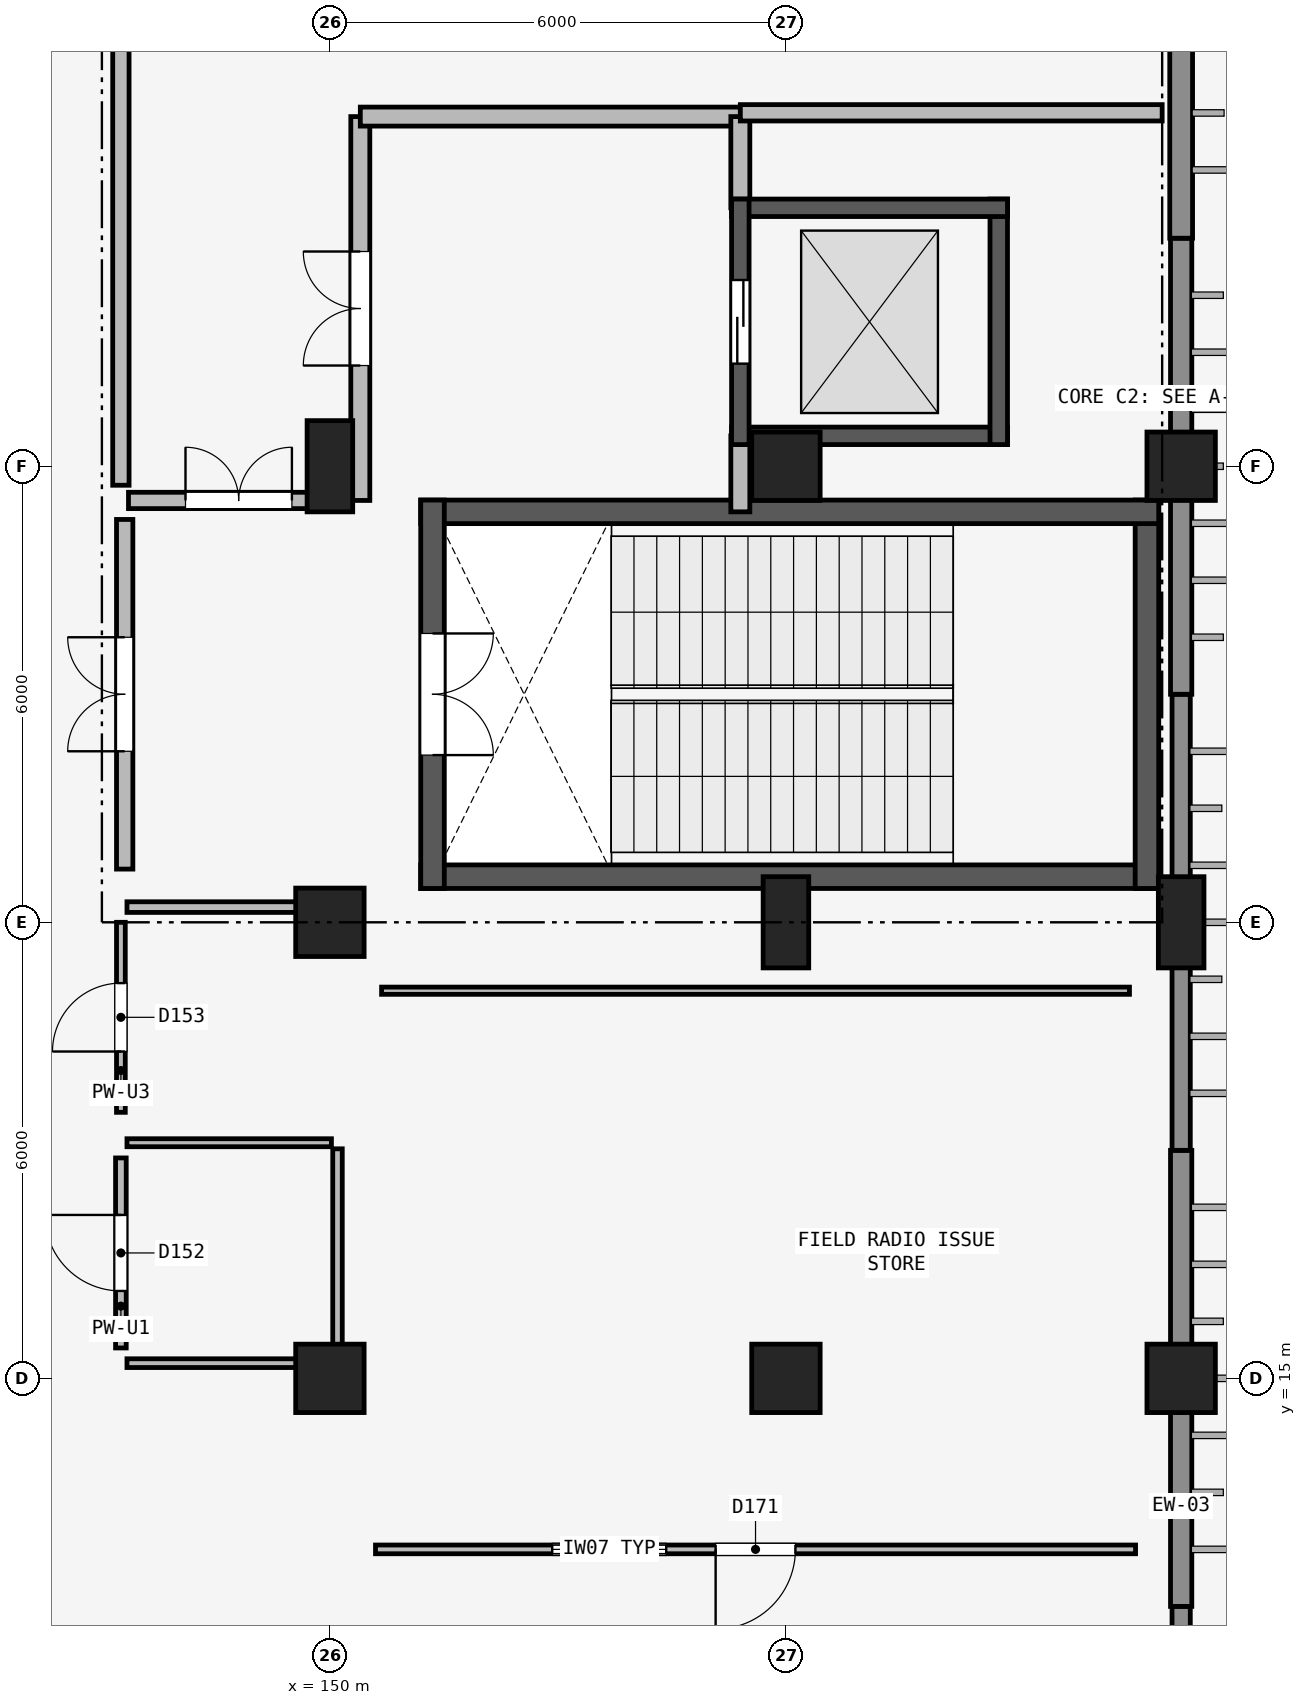
"""IFC4 building model, lengths in metres.
Left out: names, types, materials, properties, quantities, classifications, styles, units other than length and angle.
Written with IfcOpenShell. Run it as: python <this file> out.ifc"""

import sys

from ifc_helpers import new_model, si_unit, direction, frame, frame_2d, origin, origin_2d, place, context, subcontext, project, spatial, rectangle, extrude, element, fill, save


model = new_model("IFC4")
c1 = context("Model", 3, precision=1e-05, world=origin(), true_north=direction((0.0, 1.0)))
c2 = subcontext(c1, "Body", "Model", "MODEL_VIEW")
j1 = project(units=[si_unit("LENGTHUNIT", "METRE"), si_unit("PLANEANGLEUNIT", "RADIAN")], contexts=[c1])
p1 = place(None, origin())
s1 = spatial("IfcSite", under=j1, at=p1, CompositionType="ELEMENT")
p2 = place(p1, origin())
s2 = spatial("IfcBuilding", under=s1, at=p2, CompositionType="ELEMENT")
p3 = place(p2, origin())
s3 = spatial("IfcBuildingStorey", under=s2, at=p3, CompositionType="ELEMENT", Elevation=0.0)
for number, where, z_axis, x_axis in (
    (1, (150.0, 15.0, 0.0), (0.0, 0.0, 1.0), (1.0, 0.0, 0.0)),
    (2, (150.0, 21.0, 0.0), (0.0, 0.0, 1.0), (1.0, 0.0, 0.0)),
):
    element("IfcColumn", number, at=place(p3, frame(where, z_axis=z_axis, x_axis=x_axis)), inside=s3, PredefinedType="COLUMN", context=c2, shape_type="SweptSolid", body=[
        extrude(rectangle(XDim=0.9, YDim=0.9, at=origin_2d()), origin(), (0.0, 0.0, 1.0), 4.8),
    ])
p4 = place(p3, frame((150.0, 27.0, 0.0), z_axis=(0.0, 0.0, 1.0), x_axis=(1.0, 0.0, 0.0)))
e3 = element("IfcColumn", 3, at=p4, inside=s3, PredefinedType="COLUMN", context=c2, shape_type="SweptSolid", body=[
    extrude(rectangle(XDim=0.6, YDim=1.2, at=origin_2d()), origin(), (0.0, 0.0, 1.0), 4.8),
])
p5 = place(p3, frame((156.0, 15.0, 0.0), z_axis=(0.0, 0.0, 1.0), x_axis=(1.0, 0.0, 0.0)))
e4 = element("IfcColumn", 4, at=p5, inside=s3, PredefinedType="COLUMN", context=c2, shape_type="SweptSolid", body=[
    extrude(rectangle(XDim=0.9, YDim=0.9, at=origin_2d()), origin(), (0.0, 0.0, 1.0), 4.8),
])
p6 = place(p3, frame((156.0, 21.0, 0.0), z_axis=(0.0, 0.0, 1.0), x_axis=(1.0, 0.0, 0.0)))
e5 = element("IfcColumn", 5, at=p6, inside=s3, PredefinedType="COLUMN", context=c2, shape_type="SweptSolid", body=[
    extrude(rectangle(XDim=0.6, YDim=1.2, at=origin_2d()), origin(), (0.0, 0.0, 1.0), 4.8),
])
for number, where, z_axis, x_axis in (
    (6, (156.0, 27.0, 0.0), (0.0, 0.0, 1.0), (1.0, 0.0, 0.0)),
    (7, (161.2, 15.0, 0.0), (0.0, 0.0, 1.0), (1.0, 0.0, 0.0)),
):
    element("IfcColumn", number, at=place(p3, frame(where, z_axis=z_axis, x_axis=x_axis)), inside=s3, PredefinedType="COLUMN", context=c2, shape_type="SweptSolid", body=[
        extrude(rectangle(XDim=0.9, YDim=0.9, at=origin_2d()), origin(), (0.0, 0.0, 1.0), 4.8),
    ])
p7 = place(p3, frame((161.2, 21.0, 0.0), z_axis=(0.0, 0.0, 1.0), x_axis=(1.0, 0.0, 0.0)))
e8 = element("IfcColumn", 8, at=p7, inside=s3, PredefinedType="COLUMN", context=c2, shape_type="SweptSolid", body=[
    extrude(rectangle(XDim=0.6, YDim=1.2, at=origin_2d()), origin(), (0.0, 0.0, 1.0), 4.8),
])
p8 = place(p3, frame((161.2, 27.0, 0.0), z_axis=(0.0, 0.0, 1.0), x_axis=(1.0, 0.0, 0.0)))
e9 = element("IfcColumn", 9, at=p8, inside=s3, PredefinedType="COLUMN", context=c2, shape_type="SweptSolid", body=[
    extrude(rectangle(XDim=0.9, YDim=0.9, at=origin_2d()), origin(), (0.0, 0.0, 1.0), 4.8),
])
p9 = place(p3, frame((161.2, 6.0, 0.0), z_axis=(0.0, 0.0, 1.0), x_axis=(0.0, 1.0, 0.0)))
e10 = element("IfcWall", 10, at=p9, inside=s3, PredefinedType="SOLIDWALL", context=c2, shape_type="SweptSolid", body=[
    extrude(rectangle(XDim=6.0, YDim=0.24, at=frame_2d((3.0, 0.0))), origin(), (0.0, 0.0, 1.0), 3.94),
])
p10 = place(p3, frame((161.2, 12.0, 0.0), z_axis=(0.0, 0.0, 1.0), x_axis=(0.0, 1.0, 0.0)))
e11 = element("IfcWall", 11, at=p10, inside=s3, PredefinedType="SOLIDWALL", context=c2, shape_type="SweptSolid", body=[
    extrude(rectangle(XDim=6.0, YDim=0.28, at=frame_2d((3.0, 0.0))), origin(), (0.0, 0.0, 1.0), 3.94),
])
p11 = place(p3, frame((161.2, 18.0, 0.0), z_axis=(0.0, 0.0, 1.0), x_axis=(0.0, 1.0, 0.0)))
e12 = element("IfcWall", 12, at=p11, inside=s3, PredefinedType="SOLIDWALL", context=c2, shape_type="SweptSolid", body=[
    extrude(rectangle(XDim=6.0, YDim=0.24, at=frame_2d((3.0, 0.0))), origin(), (0.0, 0.0, 1.0), 3.94),
])
p12 = place(p3, frame((161.2, 24.0, 0.0), z_axis=(0.0, 0.0, 1.0), x_axis=(0.0, 1.0, 0.0)))
e13 = element("IfcWall", 13, at=p12, inside=s3, PredefinedType="SOLIDWALL", context=c2, shape_type="SweptSolid", body=[
    extrude(rectangle(XDim=6.0, YDim=0.28, at=frame_2d((3.0, 0.0))), origin(), (0.0, 0.0, 1.0), 3.94),
])
p13 = place(p3, frame((161.2, 30.0, 0.0), z_axis=(0.0, 0.0, 1.0), x_axis=(0.0, 1.0, 0.0)))
e14 = element("IfcWall", 14, at=p13, inside=s3, PredefinedType="SOLIDWALL", context=c2, shape_type="SweptSolid", body=[
    extrude(rectangle(XDim=2.546, YDim=0.3, at=frame_2d((1.273, 0.0))), origin(), (0.0, 0.0, 1.0), 3.99),
])
p14 = place(p3, frame((151.195, 21.6, 0.0), z_axis=(0.0, 0.0, 1.0), x_axis=(1.0, 0.0, 0.0)))
e15 = element("IfcWall", 15, at=p14, inside=s3, PredefinedType="SHEAR", context=c2, shape_type="SweptSolid", body=[
    extrude(rectangle(XDim=9.71, YDim=0.31, at=frame_2d((4.855, 0.0))), origin(), (0.0, 0.0, 1.0), 4.66),
])
p15 = place(p3, frame((160.75, 21.445, 0.0), z_axis=(0.0, 0.0, 1.0), x_axis=(0.0, 1.0, 0.0)))
e16 = element("IfcWall", 16, at=p15, inside=s3, PredefinedType="SHEAR", context=c2, shape_type="SweptSolid", body=[
    extrude(rectangle(XDim=5.11, YDim=0.31, at=frame_2d((2.555, 0.0))), origin(), (0.0, 0.0, 1.0), 4.66),
])
p16 = place(p3, frame((160.905, 26.4, 0.0), z_axis=(0.0, 0.0, 1.0), x_axis=(-1.0, 0.0, 0.0)))
e17 = element("IfcWall", 17, at=p16, inside=s3, PredefinedType="SHEAR", context=c2, shape_type="SweptSolid", body=[
    extrude(rectangle(XDim=9.71, YDim=0.31, at=frame_2d((4.855, 0.0))), origin(), (0.0, 0.0, 1.0), 4.66),
])
p17 = place(p3, frame((151.35, 26.555, 0.0), z_axis=(0.0, 0.0, 1.0), x_axis=(0.0, -1.0, 0.0)))
e18 = element("IfcWall", 18, at=p17, inside=s3, PredefinedType="SHEAR", context=c2, shape_type="SweptSolid", body=[
    extrude(rectangle(XDim=5.11, YDim=0.31, at=frame_2d((2.555, 0.0))), origin(), (0.0, 0.0, 1.0), 4.66),
])
p18 = place(p17, frame((1.755, 0.0, 0.0)))
e19 = element("IfcOpeningElement", 19, at=p18, cuts=e18, PredefinedType="OPENING", context=c2, shape_type="SweptSolid", body=[
    extrude(rectangle(XDim=1.6, YDim=2.2, at=frame_2d((0.8, 1.1))), frame((0.0, 0.165, 0.0), z_axis=(0.0, -1.0, 0.0), x_axis=(1.0, 0.0, 0.0)), (0.0, 0.0, 1.0), 0.33),
])
p19 = place(p3, frame((147.3, 21.7, 0.0), z_axis=(0.0, 0.0, 1.0), x_axis=(0.0, 1.0, 0.0)))
e20 = element("IfcWall", 20, at=p19, inside=s3, PredefinedType="PARTITIONING", context=c2, shape_type="SweptSolid", body=[
    extrude(rectangle(XDim=4.6, YDim=0.215, at=frame_2d((2.3, 0.0))), origin(), (0.0, 0.0, 1.0), 4.49),
])
p20 = place(p19, frame((1.55, 0.0, 0.0)))
e21 = element("IfcOpeningElement", 21, at=p20, cuts=e20, PredefinedType="OPENING", context=c2, shape_type="SweptSolid", body=[
    extrude(rectangle(XDim=1.5, YDim=2.15, at=frame_2d((0.75, 1.075))), frame((0.0, 0.117, 0.0), z_axis=(0.0, -1.0, 0.0), x_axis=(1.0, 0.0, 0.0)), (0.0, 0.0, 1.0), 0.235),
])
p21 = place(p3, frame((150.4, 26.55, 0.0), z_axis=(0.0, 0.0, 1.0), x_axis=(0.0, 1.0, 0.0)))
e22 = element("IfcWall", 22, at=p21, inside=s3, PredefinedType="PARTITIONING", context=c2, shape_type="SweptSolid", body=[
    extrude(rectangle(XDim=5.05, YDim=0.25, at=frame_2d((2.525, 0.0))), origin(), (0.0, 0.0, 1.0), 3.89),
])
p22 = place(p21, frame((1.775, 0.0, 0.0)))
e23 = element("IfcOpeningElement", 23, at=p22, cuts=e22, PredefinedType="OPENING", context=c2, shape_type="SweptSolid", body=[
    extrude(rectangle(XDim=1.5, YDim=2.15, at=frame_2d((0.75, 1.075))), frame((0.0, 0.135, 0.0), z_axis=(0.0, -1.0, 0.0), x_axis=(1.0, 0.0, 0.0)), (0.0, 0.0, 1.0), 0.27),
])
p23 = place(p3, frame((150.4, 31.6, 0.0), z_axis=(0.0, 0.0, 1.0), x_axis=(1.0, 0.0, 0.0)))
e24 = element("IfcWall", 24, at=p23, inside=s3, PredefinedType="PARTITIONING", context=c2, shape_type="SweptSolid", body=[
    extrude(rectangle(XDim=5.0, YDim=0.25, at=frame_2d((2.5, 0.0))), origin(), (0.0, 0.0, 1.0), 4.09),
])
p24 = place(p3, frame((155.4, 30.4, 0.0), z_axis=(0.0, 0.0, 1.0), x_axis=(0.0, 1.0, 0.0)))
e25 = element("IfcWall", 25, at=p24, inside=s3, PredefinedType="PARTITIONING", context=c2, shape_type="SweptSolid", body=[
    extrude(rectangle(XDim=1.2, YDim=0.25, at=frame_2d((0.6, 0.0))), origin(), (0.0, 0.0, 1.0), 4.49),
])
p25 = place(p3, frame((155.4, 26.4, 0.0), z_axis=(0.0, 0.0, 1.0), x_axis=(0.0, 1.0, 0.0)))
e26 = element("IfcWall", 26, at=p25, inside=s3, PredefinedType="PARTITIONING", context=c2, shape_type="SweptSolid", body=[
    extrude(rectangle(XDim=1.0, YDim=0.25, at=frame_2d((0.5, 0.0))), origin(), (0.0, 0.0, 1.0), 3.89),
])
p26 = place(p3, frame((155.285, 27.4, 0.0), z_axis=(0.0, 0.0, 1.0), x_axis=(1.0, 0.0, 0.0)))
e27 = element("IfcWall", 27, at=p26, inside=s3, PredefinedType="SHEAR", context=c2, shape_type="SweptSolid", body=[
    extrude(rectangle(XDim=3.63, YDim=0.23, at=frame_2d((1.815, 0.0))), origin(), (0.0, 0.0, 1.0), 4.8),
])
p27 = place(p3, frame((158.8, 27.285, 0.0), z_axis=(0.0, 0.0, 1.0), x_axis=(0.0, 1.0, 0.0)))
e28 = element("IfcWall", 28, at=p27, inside=s3, PredefinedType="SHEAR", context=c2, shape_type="SweptSolid", body=[
    extrude(rectangle(XDim=3.23, YDim=0.23, at=frame_2d((1.615, 0.0))), origin(), (0.0, 0.0, 1.0), 4.8),
])
p28 = place(p3, frame((158.915, 30.4, 0.0), z_axis=(0.0, 0.0, 1.0), x_axis=(-1.0, 0.0, 0.0)))
e29 = element("IfcWall", 29, at=p28, inside=s3, PredefinedType="SHEAR", context=c2, shape_type="SweptSolid", body=[
    extrude(rectangle(XDim=3.63, YDim=0.23, at=frame_2d((1.815, 0.0))), origin(), (0.0, 0.0, 1.0), 4.8),
])
p29 = place(p3, frame((155.4, 30.515, 0.0), z_axis=(0.0, 0.0, 1.0), x_axis=(0.0, -1.0, 0.0)))
e30 = element("IfcWall", 30, at=p29, inside=s3, PredefinedType="SHEAR", context=c2, shape_type="SweptSolid", body=[
    extrude(rectangle(XDim=3.23, YDim=0.23, at=frame_2d((1.615, 0.0))), origin(), (0.0, 0.0, 1.0), 4.8),
])
p30 = place(p29, frame((1.065, 0.0, 0.0)))
e31 = element("IfcOpeningElement", 31, at=p30, cuts=e30, PredefinedType="OPENING", context=c2, shape_type="SweptSolid", body=[
    extrude(rectangle(XDim=1.1, YDim=2.2, at=frame_2d((0.55, 1.1))), frame((0.0, 0.125, 0.0), z_axis=(0.0, -1.0, 0.0), x_axis=(1.0, 0.0, 0.0)), (0.0, 0.0, 1.0), 0.25),
])
p31 = place(p3, frame((147.35, 26.55, 0.0), z_axis=(0.0, 0.0, 1.0), x_axis=(1.0, 0.0, 0.0)))
e32 = element("IfcWall", 32, at=p31, inside=s3, PredefinedType="PARTITIONING", context=c2, shape_type="SweptSolid", body=[
    extrude(rectangle(XDim=2.9, YDim=0.215, at=frame_2d((1.45, 0.0))), origin(), (0.0, 0.0, 1.0), 4.166),
])
p32 = place(p31, frame((0.75, 0.0, 0.0)))
e33 = element("IfcOpeningElement", 33, at=p32, cuts=e32, PredefinedType="OPENING", context=c2, shape_type="SweptSolid", body=[
    extrude(rectangle(XDim=1.4, YDim=2.2, at=frame_2d((0.7, 1.1))), frame((0.0, 0.117, 0.0), z_axis=(0.0, -1.0, 0.0), x_axis=(1.0, 0.0, 0.0)), (0.0, 0.0, 1.0), 0.235),
])
p33 = place(p3, frame((147.25, 26.75, 0.0), z_axis=(0.0, 0.0, 1.0), x_axis=(0.0, 1.0, 0.0)))
e34 = element("IfcWall", 34, at=p33, inside=s3, PredefinedType="PARTITIONING", context=c2, shape_type="SweptSolid", body=[
    extrude(rectangle(XDim=10.5, YDim=0.215, at=frame_2d((5.25, 0.0))), origin(), (0.0, 0.0, 1.0), 3.99),
])
p34 = place(p3, frame((155.4, 31.65, 0.0), z_axis=(0.0, 0.0, 1.0), x_axis=(1.0, 0.0, 0.0)))
e35 = element("IfcWall", 35, at=p34, inside=s3, PredefinedType="PARTITIONING", context=c2, shape_type="SweptSolid", body=[
    extrude(rectangle(XDim=5.55, YDim=0.215, at=frame_2d((2.775, 0.0))), origin(), (0.0, 0.0, 1.0), 3.99),
])
p35 = place(p3, frame((147.25, 15.4, 0.0), z_axis=(0.0, 0.0, 1.0), x_axis=(0.0, 1.0, 0.0)))
e36 = element("IfcWall", 36, at=p35, inside=s3, PredefinedType="PARTITIONING", context=c2, shape_type="SweptSolid", body=[
    extrude(rectangle(XDim=2.5, YDim=0.14, at=frame_2d((1.25, 0.0))), origin(), (0.0, 0.0, 1.0), 4.49),
])
p36 = place(p35, frame((0.75, 0.0, 0.0)))
e37 = element("IfcOpeningElement", 37, at=p36, cuts=e36, PredefinedType="OPENING", context=c2, shape_type="SweptSolid", body=[
    extrude(rectangle(XDim=1.0, YDim=2.1, at=frame_2d((0.5, 1.05))), frame((0.0, 0.08, 0.0), z_axis=(0.0, -1.0, 0.0), x_axis=(1.0, 0.0, 0.0)), (0.0, 0.0, 1.0), 0.16),
])
p37 = place(p3, frame((147.25, 18.5, 0.0), z_axis=(0.0, 0.0, 1.0), x_axis=(0.0, 1.0, 0.0)))
e38 = element("IfcWall", 38, at=p37, inside=s3, PredefinedType="PARTITIONING", context=c2, shape_type="SweptSolid", body=[
    extrude(rectangle(XDim=2.5, YDim=0.115, at=frame_2d((1.25, 0.0))), origin(), (0.0, 0.0, 1.0), 3.99),
])
p38 = place(p37, frame((0.8, 0.0, 0.0)))
e39 = element("IfcOpeningElement", 39, at=p38, cuts=e38, PredefinedType="OPENING", context=c2, shape_type="SweptSolid", body=[
    extrude(rectangle(XDim=0.9, YDim=2.1, at=frame_2d((0.45, 1.05))), frame((0.0, 0.067, 0.0), z_axis=(0.0, -1.0, 0.0), x_axis=(1.0, 0.0, 0.0)), (0.0, 0.0, 1.0), 0.135),
])
p39 = place(p3, frame((160.6, 12.75, 0.0), z_axis=(0.0, 0.0, 1.0), x_axis=(-1.0, 0.0, 0.0)))
e40 = element("IfcWall", 40, at=p39, inside=s3, PredefinedType="PARTITIONING", context=c2, shape_type="SweptSolid", body=[
    extrude(rectangle(XDim=10.0, YDim=0.115, at=frame_2d((5.0, 0.0))), origin(), (0.0, 0.0, 1.0), 4.09),
])
p40 = place(p39, frame((4.475, 0.0, 0.0)))
e41 = element("IfcOpeningElement", 41, at=p40, cuts=e40, PredefinedType="OPENING", context=c2, shape_type="SweptSolid", body=[
    extrude(rectangle(XDim=1.05, YDim=2.2, at=frame_2d((0.525, 1.1))), frame((0.0, 0.067, 0.0), z_axis=(0.0, -1.0, 0.0), x_axis=(1.0, 0.0, 0.0)), (0.0, 0.0, 1.0), 0.135),
])
p41 = place(p39, frame((6.175, 0.0, 1.0)))
e42 = element("IfcOpeningElement", 42, at=p41, cuts=e40, PredefinedType="OPENING", context=c2, shape_type="SweptSolid", body=[
    extrude(rectangle(XDim=1.5, YDim=1.2, at=frame_2d((0.75, 0.6))), frame((0.0, 0.067, 0.0), z_axis=(0.0, -1.0, 0.0), x_axis=(1.0, 0.0, 0.0)), (0.0, 0.0, 1.0), 0.135),
])
p42 = place(p3, frame((150.1, 18.02, 0.0), z_axis=(0.0, 0.0, 1.0), x_axis=(0.0, -1.0, 0.0)))
e43 = element("IfcWall", 43, at=p42, inside=s3, PredefinedType="PARTITIONING", context=c2, shape_type="SweptSolid", body=[
    extrude(rectangle(XDim=2.74, YDim=0.125, at=frame_2d((1.37, 0.0))), origin(), (0.0, 0.0, 1.0), 4.083),
])
p43 = place(p3, frame((150.02, 15.2, 0.0), z_axis=(0.0, 0.0, 1.0), x_axis=(-1.0, 0.0, 0.0)))
e44 = element("IfcWall", 44, at=p43, inside=s3, PredefinedType="PARTITIONING", context=c2, shape_type="SweptSolid", body=[
    extrude(rectangle(XDim=2.69, YDim=0.115, at=frame_2d((1.345, 0.0))), origin(), (0.0, 0.0, 1.0), 3.89),
])
p44 = place(p3, frame((147.33, 18.1, 0.0), z_axis=(0.0, 0.0, 1.0), x_axis=(1.0, 0.0, 0.0)))
e45 = element("IfcWall", 45, at=p44, inside=s3, PredefinedType="PARTITIONING", context=c2, shape_type="SweptSolid", body=[
    extrude(rectangle(XDim=2.69, YDim=0.105, at=frame_2d((1.345, 0.0))), origin(), (0.0, 0.0, 1.0), 4.083),
])
p45 = place(p3, frame((147.33, 21.2, 0.0), z_axis=(0.0, 0.0, 1.0), x_axis=(1.0, 0.0, 0.0)))
e46 = element("IfcWall", 46, at=p45, inside=s3, PredefinedType="PARTITIONING", context=c2, shape_type="SweptSolid", body=[
    extrude(rectangle(XDim=2.69, YDim=0.14, at=frame_2d((1.345, 0.0))), origin(), (0.0, 0.0, 1.0), 3.89),
])
p46 = place(p3, frame((150.68, 20.1, 0.0), z_axis=(0.0, 0.0, 1.0), x_axis=(1.0, 0.0, 0.0)))
e47 = element("IfcWall", 47, at=p46, inside=s3, PredefinedType="PARTITIONING", context=c2, shape_type="SweptSolid", body=[
    extrude(rectangle(XDim=9.84, YDim=0.095, at=frame_2d((4.92, 0.0))), origin(), (0.0, 0.0, 1.0), 4.083),
])
p47 = place(p18, origin())
e48 = element("IfcDoor", 48, at=p47, inside=s3, OperationType="DOUBLE_DOOR_SINGLE_SWING", PredefinedType="DOOR", context=c2, shape_type="SweptSolid", body=[
    extrude(rectangle(XDim=1.6, YDim=2.2, at=frame_2d((0.8, 1.1))), frame((0.0, 0.025, 0.0), z_axis=(0.0, -1.0, 0.0), x_axis=(1.0, 0.0, 0.0)), (0.0, 0.0, 1.0), 0.05),
])
fill(e19, e48)
p48 = place(p20, origin())
e49 = element("IfcDoor", 49, at=p48, inside=s3, OperationType="DOUBLE_DOOR_SINGLE_SWING", PredefinedType="DOOR", context=c2, shape_type="SweptSolid", body=[
    extrude(rectangle(XDim=1.5, YDim=2.15, at=frame_2d((0.75, 1.075))), frame((0.0, 0.025, 0.0), z_axis=(0.0, -1.0, 0.0), x_axis=(1.0, 0.0, 0.0)), (0.0, 0.0, 1.0), 0.05),
])
fill(e21, e49)
p49 = place(p22, origin())
e50 = element("IfcDoor", 50, at=p49, inside=s3, OperationType="DOUBLE_DOOR_SINGLE_SWING", PredefinedType="DOOR", context=c2, shape_type="SweptSolid", body=[
    extrude(rectangle(XDim=1.5, YDim=2.15, at=frame_2d((0.75, 1.075))), frame((0.0, 0.025, 0.0), z_axis=(0.0, -1.0, 0.0), x_axis=(1.0, 0.0, 0.0)), (0.0, 0.0, 1.0), 0.05),
])
fill(e23, e50)
p50 = place(p30, origin())
e51 = element("IfcDoor", 51, at=p50, inside=s3, OperationType="SLIDING_TO_LEFT", PredefinedType="DOOR", context=c2, shape_type="SweptSolid", body=[
    extrude(rectangle(XDim=1.1, YDim=2.2, at=frame_2d((0.55, 1.1))), frame((0.0, 0.025, 0.0), z_axis=(0.0, -1.0, 0.0), x_axis=(1.0, 0.0, 0.0)), (0.0, 0.0, 1.0), 0.05),
])
fill(e31, e51)
p51 = place(p32, origin())
e52 = element("IfcDoor", 52, at=p51, inside=s3, OperationType="DOUBLE_DOOR_SINGLE_SWING", PredefinedType="DOOR", context=c2, shape_type="SweptSolid", body=[
    extrude(rectangle(XDim=1.4, YDim=2.2, at=frame_2d((0.7, 1.1))), frame((0.0, 0.025, 0.0), z_axis=(0.0, -1.0, 0.0), x_axis=(1.0, 0.0, 0.0)), (0.0, 0.0, 1.0), 0.05),
])
fill(e33, e52)
p52 = place(p36, origin())
e53 = element("IfcDoor", 53, at=p52, inside=s3, OperationType="SINGLE_SWING_RIGHT", PredefinedType="DOOR", context=c2, shape_type="SweptSolid", body=[
    extrude(rectangle(XDim=1.0, YDim=2.1, at=frame_2d((0.5, 1.05))), frame((0.0, 0.025, 0.0), z_axis=(0.0, -1.0, 0.0), x_axis=(1.0, 0.0, 0.0)), (0.0, 0.0, 1.0), 0.05),
])
fill(e37, e53)
p53 = place(p38, origin())
e54 = element("IfcDoor", 54, at=p53, inside=s3, OperationType="SINGLE_SWING_LEFT", PredefinedType="DOOR", context=c2, shape_type="SweptSolid", body=[
    extrude(rectangle(XDim=0.9, YDim=2.1, at=frame_2d((0.45, 1.05))), frame((0.0, 0.025, 0.0), z_axis=(0.0, -1.0, 0.0), x_axis=(1.0, 0.0, 0.0)), (0.0, 0.0, 1.0), 0.05),
])
fill(e39, e54)
p54 = place(p40, origin())
e55 = element("IfcDoor", 55, at=p54, inside=s3, OperationType="SINGLE_SWING_RIGHT", PredefinedType="DOOR", context=c2, shape_type="SweptSolid", body=[
    extrude(rectangle(XDim=1.05, YDim=2.2, at=frame_2d((0.525, 1.1))), frame((0.0, 0.025, 0.0), z_axis=(0.0, -1.0, 0.0), x_axis=(1.0, 0.0, 0.0)), (0.0, 0.0, 1.0), 0.05),
])
fill(e41, e55)
p55 = place(p41, origin())
e56 = element("IfcWindow", 56, at=p55, inside=s3, PartitioningType="SINGLE_PANEL", PredefinedType="WINDOW", context=c2, shape_type="SweptSolid", body=[
    extrude(rectangle(XDim=1.5, YDim=1.2, at=frame_2d((0.75, 0.6))), frame((0.0, 0.03, 0.0), z_axis=(0.0, -1.0, 0.0), x_axis=(1.0, 0.0, 0.0)), (0.0, 0.0, 1.0), 0.06),
])
fill(e42, e56)
save(model, sys.argv[1])
